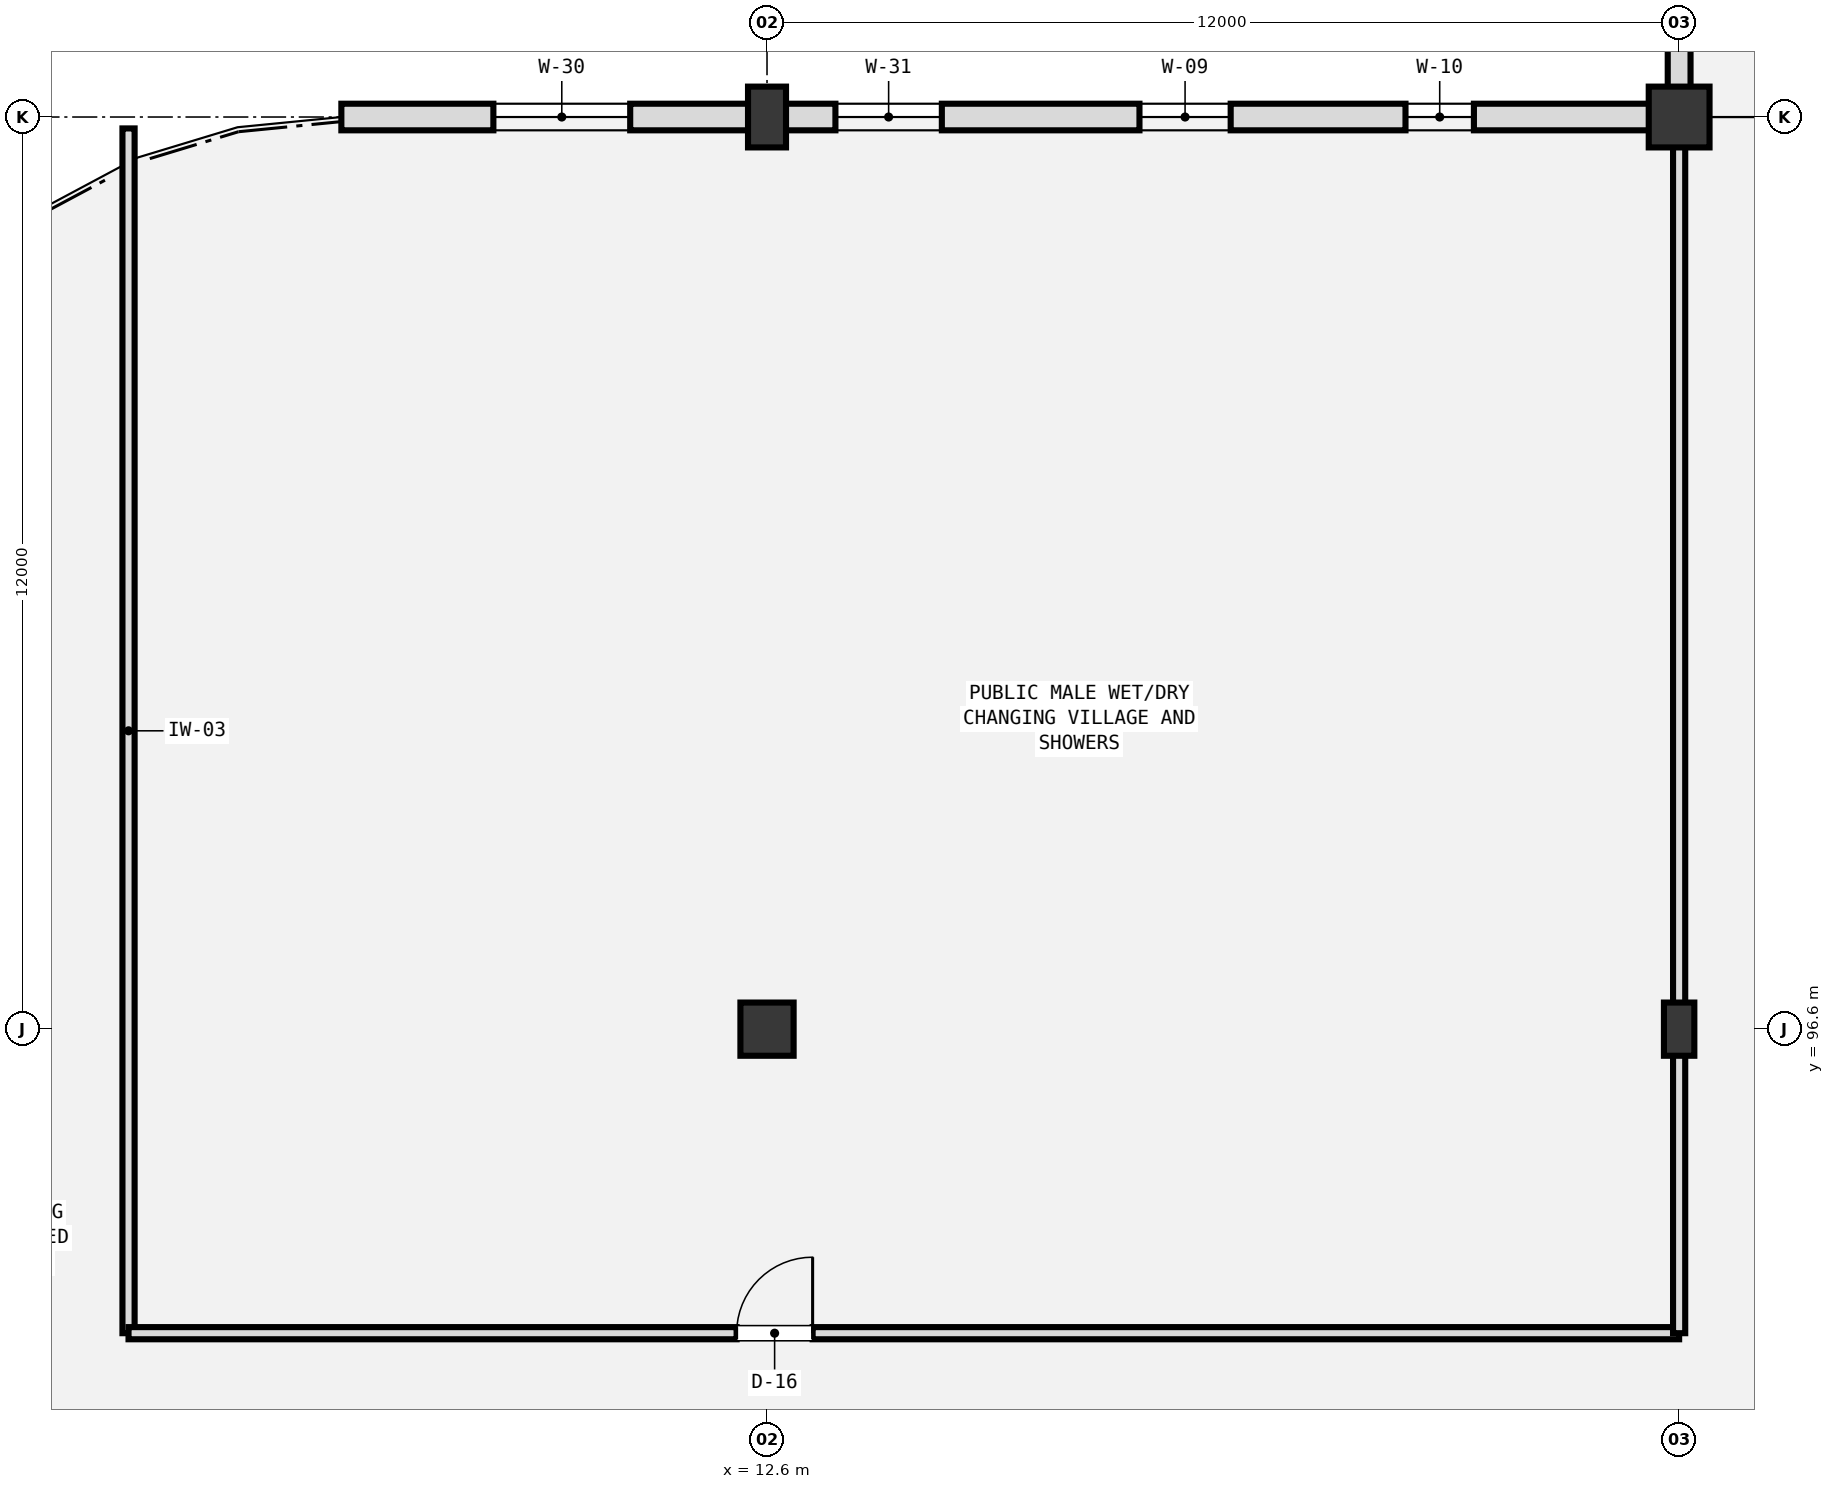
"""IFC4 building model, lengths in metres.
Left out: names, types, materials, properties, quantities, classifications, styles, units other than length and angle.
Written with IfcOpenShell. Run it as: python <this file> out.ifc"""

import sys

from ifc_helpers import new_model, si_unit, direction, frame, frame_2d, origin, origin_2d, place, context, subcontext, project, spatial, rectangle, extrude, element, fill, save


model = new_model("IFC4")
c1 = context("Model", 3, precision=1e-05, world=origin(), true_north=direction((0.0, 1.0)))
c2 = subcontext(c1, "Body", "Model", "MODEL_VIEW")
j1 = project(units=[si_unit("LENGTHUNIT", "METRE"), si_unit("PLANEANGLEUNIT", "RADIAN")], contexts=[c1])
p1 = place(None, origin())
s1 = spatial("IfcSite", under=j1, at=p1, CompositionType="ELEMENT")
p2 = place(p1, origin())
s2 = spatial("IfcBuilding", under=s1, at=p2, CompositionType="ELEMENT")
p3 = place(p2, origin())
s3 = spatial("IfcBuildingStorey", under=s2, at=p3, CompositionType="ELEMENT", Elevation=0.0)
p4 = place(p3, frame((12.6, 96.6, 0.0), z_axis=(0.0, 0.0, 1.0), x_axis=(1.0, 0.0, 0.0)))
e1 = element("IfcColumn", 1, at=p4, inside=s3, PredefinedType="COLUMN", context=c2, shape_type="SweptSolid", body=[
    extrude(rectangle(XDim=0.7, YDim=0.7, at=origin_2d()), origin(), (0.0, 0.0, 1.0), 5.4),
])
p5 = place(p3, frame((12.6, 108.6, 0.0), z_axis=(0.0, 0.0, 1.0), x_axis=(1.0, 0.0, 0.0)))
e2 = element("IfcColumn", 2, at=p5, inside=s3, PredefinedType="COLUMN", context=c2, shape_type="SweptSolid", body=[
    extrude(rectangle(XDim=0.5, YDim=0.8, at=origin_2d()), origin(), (0.0, 0.0, 1.0), 5.4),
])
p6 = place(p3, frame((24.6, 96.6, 0.0), z_axis=(0.0, 0.0, 1.0), x_axis=(1.0, 0.0, 0.0)))
e3 = element("IfcColumn", 3, at=p6, inside=s3, PredefinedType="PILASTER", context=c2, shape_type="SweptSolid", body=[
    extrude(rectangle(XDim=0.4, YDim=0.7, at=origin_2d()), origin(), (0.0, 0.0, 1.0), 5.4),
])
p7 = place(p3, frame((24.6, 108.6, 0.0), z_axis=(0.0, 0.0, 1.0), x_axis=(1.0, 0.0, 0.0)))
e4 = element("IfcColumn", 4, at=p7, inside=s3, PredefinedType="COLUMN", context=c2, shape_type="SweptSolid", body=[
    extrude(rectangle(XDim=0.8, YDim=0.8, at=origin_2d()), origin(), (0.0, 0.0, 1.0), 5.4),
])
p8 = place(p3, frame((7.0, 108.6, 0.0), z_axis=(0.0, 0.0, 1.0), x_axis=(1.0, 0.0, 0.0)))
e5 = element("IfcWall", 5, at=p8, inside=s3, PredefinedType="SOLIDWALL", context=c2, shape_type="SweptSolid", body=[
    extrude(rectangle(XDim=17.6, YDim=0.35, at=frame_2d((8.8, 0.0))), origin(), (0.0, 0.0, 1.0), 4.79),
])
p9 = place(p8, frame((2.0, 0.0, 1.8)))
e6 = element("IfcOpeningElement", 6, at=p9, cuts=e5, PredefinedType="OPENING", context=c2, shape_type="SweptSolid", body=[
    extrude(rectangle(XDim=1.8, YDim=0.75, at=frame_2d((0.9, 0.375))), frame((0.0, 0.185, 0.0), z_axis=(0.0, -1.0, 0.0), x_axis=(1.0, 0.0, 0.0)), (0.0, 0.0, 1.0), 0.37),
])
p10 = place(p8, frame((6.5, 0.0, 1.8)))
e7 = element("IfcOpeningElement", 7, at=p10, cuts=e5, PredefinedType="OPENING", context=c2, shape_type="SweptSolid", body=[
    extrude(rectangle(XDim=1.4, YDim=0.75, at=frame_2d((0.7, 0.375))), frame((0.0, 0.185, 0.0), z_axis=(0.0, -1.0, 0.0), x_axis=(1.0, 0.0, 0.0)), (0.0, 0.0, 1.0), 0.37),
])
p11 = place(p8, frame((10.5, 0.0, 1.8)))
e8 = element("IfcOpeningElement", 8, at=p11, cuts=e5, PredefinedType="OPENING", context=c2, shape_type="SweptSolid", body=[
    extrude(rectangle(XDim=1.2, YDim=1.2, at=frame_2d((0.6, 0.6))), frame((0.0, 0.185, 0.0), z_axis=(0.0, -1.0, 0.0), x_axis=(1.0, 0.0, 0.0)), (0.0, 0.0, 1.0), 0.37),
])
p12 = place(p8, frame((14.0, 0.0, 1.8)))
e9 = element("IfcOpeningElement", 9, at=p12, cuts=e5, PredefinedType="OPENING", context=c2, shape_type="SweptSolid", body=[
    extrude(rectangle(XDim=0.9, YDim=0.9, at=frame_2d((0.45, 0.45))), frame((0.0, 0.185, 0.0), z_axis=(0.0, -1.0, 0.0), x_axis=(1.0, 0.0, 0.0)), (0.0, 0.0, 1.0), 0.37),
])
p13 = place(p3, frame((24.6, 108.6, 0.0), z_axis=(0.0, 0.0, 1.0), x_axis=(0.0, 1.0, 0.0)))
e10 = element("IfcWall", 10, at=p13, inside=s3, PredefinedType="SOLIDWALL", context=c2, shape_type="SweptSolid", body=[
    extrude(rectangle(XDim=27.4, YDim=0.3, at=frame_2d((13.7, 0.0))), origin(), (0.0, 0.0, 1.0), 4.48),
])
p14 = place(p13, frame((3.1, 0.0, 0.9)))
e11 = element("IfcOpeningElement", 11, at=p14, cuts=e10, PredefinedType="OPENING", context=c2, shape_type="SweptSolid", body=[
    extrude(rectangle(XDim=3.2, YDim=1.5, at=frame_2d((1.6, 0.75))), frame((0.0, 0.16, 0.0), z_axis=(0.0, -1.0, 0.0), x_axis=(1.0, 0.0, 0.0)), (0.0, 0.0, 1.0), 0.32),
])
p15 = place(p13, frame((14.8, 0.0, 0.9)))
e12 = element("IfcOpeningElement", 12, at=p15, cuts=e10, PredefinedType="OPENING", context=c2, shape_type="SweptSolid", body=[
    extrude(rectangle(XDim=3.6, YDim=1.5, at=frame_2d((1.8, 0.75))), frame((0.0, 0.16, 0.0), z_axis=(0.0, -1.0, 0.0), x_axis=(1.0, 0.0, 0.0)), (0.0, 0.0, 1.0), 0.32),
])
p16 = place(p13, frame((20.6, 0.0, 0.9)))
e13 = element("IfcOpeningElement", 13, at=p16, cuts=e10, PredefinedType="OPENING", context=c2, shape_type="SweptSolid", body=[
    extrude(rectangle(XDim=3.6, YDim=1.5, at=frame_2d((1.8, 0.75))), frame((0.0, 0.16, 0.0), z_axis=(0.0, -1.0, 0.0), x_axis=(1.0, 0.0, 0.0)), (0.0, 0.0, 1.0), 0.32),
])
p17 = place(p3, frame((4.2, 92.6, 0.0), z_axis=(0.0, 0.0, 1.0), x_axis=(0.0, 1.0, 0.0)))
e14 = element("IfcWall", 14, at=p17, inside=s3, PredefinedType="PLUMBINGWALL", context=c2, shape_type="SweptSolid", body=[
    extrude(rectangle(XDim=15.85, YDim=0.16, at=frame_2d((7.925, 0.0))), origin(), (0.0, 0.0, 1.0), 3.9),
])
p18 = place(p3, frame((4.2, 92.6, 0.0), z_axis=(0.0, 0.0, 1.0), x_axis=(1.0, 0.0, 0.0)))
e15 = element("IfcWall", 15, at=p18, inside=s3, PredefinedType="PLUMBINGWALL", context=c2, shape_type="SweptSolid", body=[
    extrude(rectangle(XDim=20.4, YDim=0.16, at=frame_2d((10.2, 0.0))), origin(), (0.0, 0.0, 1.0), 3.9),
])
p19 = place(p18, frame((8.0, 0.0, 0.0)))
e16 = element("IfcOpeningElement", 16, at=p19, cuts=e15, PredefinedType="OPENING", context=c2, shape_type="SweptSolid", body=[
    extrude(rectangle(XDim=1.0, YDim=2.2, at=frame_2d((0.5, 1.1))), frame((0.0, 0.09, 0.0), z_axis=(0.0, -1.0, 0.0), x_axis=(1.0, 0.0, 0.0)), (0.0, 0.0, 1.0), 0.18),
])
p20 = place(p3, frame((24.6, 92.6, 0.0), z_axis=(0.0, 0.0, 1.0), x_axis=(0.0, 1.0, 0.0)))
e17 = element("IfcWall", 17, at=p20, inside=s3, PredefinedType="PLUMBINGWALL", context=c2, shape_type="SweptSolid", body=[
    extrude(rectangle(XDim=15.825, YDim=0.16, at=frame_2d((7.913, 0.0))), origin(), (0.0, 0.0, 1.0), 3.9),
])
p21 = place(p9, origin())
e18 = element("IfcWindow", 18, at=p21, inside=s3, PartitioningType="SINGLE_PANEL", PredefinedType="WINDOW", context=c2, shape_type="SweptSolid", body=[
    extrude(rectangle(XDim=1.8, YDim=0.75, at=frame_2d((0.9, 0.375))), frame((0.0, 0.03, 0.0), z_axis=(0.0, -1.0, 0.0), x_axis=(1.0, 0.0, 0.0)), (0.0, 0.0, 1.0), 0.06),
])
fill(e6, e18)
p22 = place(p10, origin())
e19 = element("IfcWindow", 19, at=p22, inside=s3, PartitioningType="SINGLE_PANEL", PredefinedType="WINDOW", context=c2, shape_type="SweptSolid", body=[
    extrude(rectangle(XDim=1.4, YDim=0.75, at=frame_2d((0.7, 0.375))), frame((0.0, 0.03, 0.0), z_axis=(0.0, -1.0, 0.0), x_axis=(1.0, 0.0, 0.0)), (0.0, 0.0, 1.0), 0.06),
])
fill(e7, e19)
p23 = place(p11, origin())
e20 = element("IfcWindow", 20, at=p23, inside=s3, PartitioningType="SINGLE_PANEL", PredefinedType="WINDOW", context=c2, shape_type="SweptSolid", body=[
    extrude(rectangle(XDim=1.2, YDim=1.2, at=frame_2d((0.6, 0.6))), frame((0.0, 0.03, 0.0), z_axis=(0.0, -1.0, 0.0), x_axis=(1.0, 0.0, 0.0)), (0.0, 0.0, 1.0), 0.06),
])
fill(e8, e20)
p24 = place(p12, origin())
e21 = element("IfcWindow", 21, at=p24, inside=s3, PartitioningType="SINGLE_PANEL", PredefinedType="WINDOW", context=c2, shape_type="SweptSolid", body=[
    extrude(rectangle(XDim=0.9, YDim=0.9, at=frame_2d((0.45, 0.45))), frame((0.0, 0.03, 0.0), z_axis=(0.0, -1.0, 0.0), x_axis=(1.0, 0.0, 0.0)), (0.0, 0.0, 1.0), 0.06),
])
fill(e9, e21)
p25 = place(p19, origin())
e22 = element("IfcDoor", 22, at=p25, inside=s3, OperationType="SINGLE_SWING_RIGHT", PredefinedType="DOOR", context=c2, shape_type="SweptSolid", body=[
    extrude(rectangle(XDim=1.0, YDim=2.2, at=frame_2d((0.5, 1.1))), frame((0.0, 0.025, 0.0), z_axis=(0.0, -1.0, 0.0), x_axis=(1.0, 0.0, 0.0)), (0.0, 0.0, 1.0), 0.05),
])
fill(e16, e22)
save(model, sys.argv[1])
